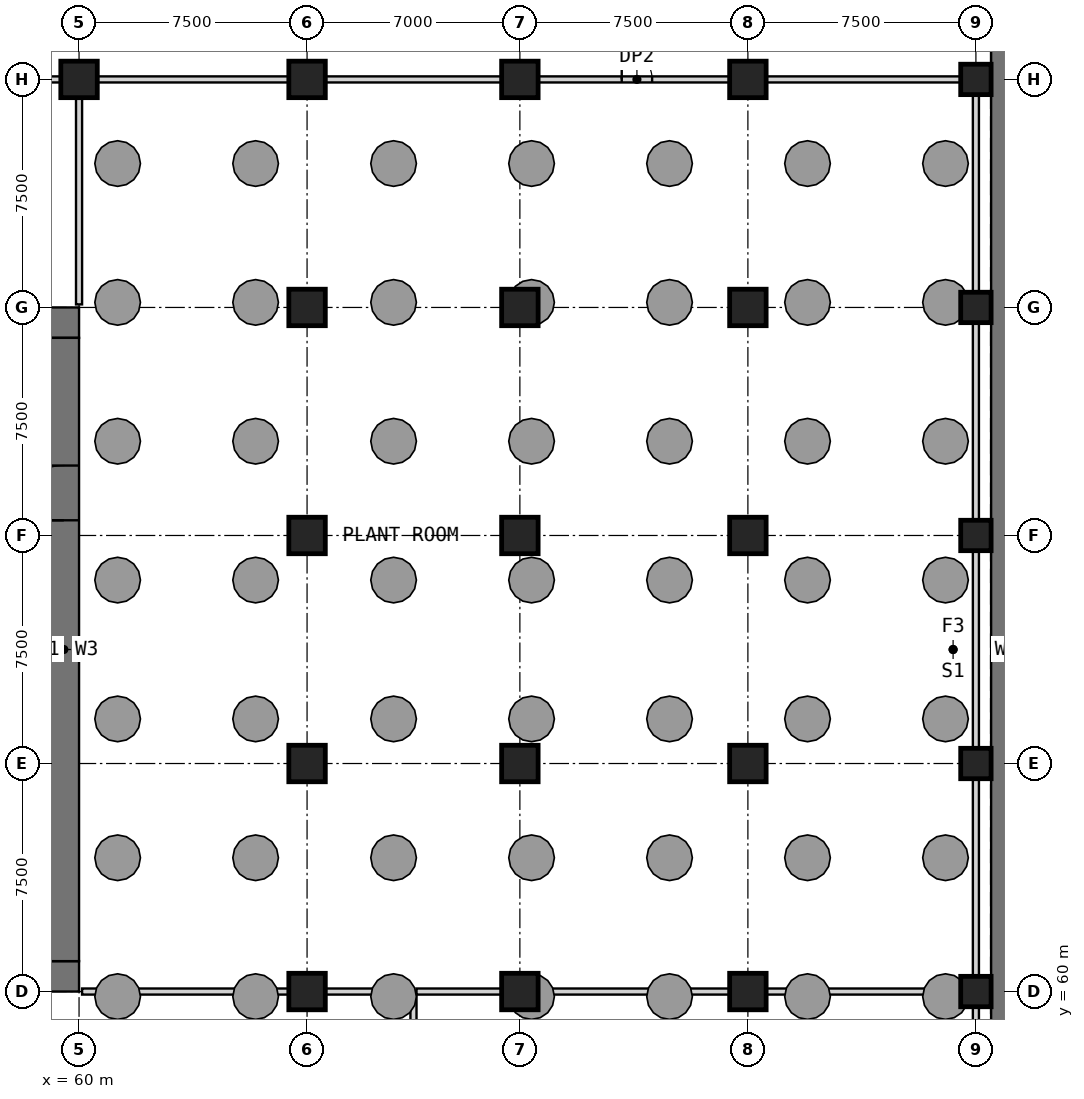
"""IFC4 building model, lengths in metres.
Left out: names, types, materials, properties, quantities, classifications, styles, units other than length and angle.
Written with IfcOpenShell. Run it as: python <this file> out.ifc"""

import sys

from ifc_helpers import new_model, si_unit, direction, frame, frame_2d, origin, origin_2d, place, context, subcontext, project, spatial, rectangle, extrude, element, fill, save


model = new_model("IFC4")
c1 = context("Model", 3, precision=1e-05, world=origin(), true_north=direction((0.0, 1.0)))
c2 = subcontext(c1, "Body", "Model", "MODEL_VIEW")
j1 = project(units=[si_unit("LENGTHUNIT", "METRE"), si_unit("PLANEANGLEUNIT", "RADIAN")], contexts=[c1])
p1 = place(None, origin())
s1 = spatial("IfcSite", under=j1, at=p1, CompositionType="ELEMENT")
p2 = place(p1, origin())
s2 = spatial("IfcBuilding", under=s1, at=p2, CompositionType="ELEMENT")
p3 = place(p2, frame((0.0, 0.0, -12.0)))
s3 = spatial("IfcBuildingStorey", under=s2, at=p3, CompositionType="ELEMENT", Elevation=-12.0)
p4 = place(p3, frame((90.5, 25.0, 0.0), z_axis=(0.0, 0.0, 1.0), x_axis=(0.0, 1.0, 0.0)))
e1 = element("IfcWall", 1, at=p4, inside=s3, PredefinedType="SHEAR", context=c2, shape_type="SweptSolid", body=[
    extrude(rectangle(XDim=92.5, YDim=1.0, at=frame_2d((46.25, 0.0))), origin(), (0.0, 0.0, 1.0), 5.4),
])
p5 = place(p4, frame((23.15, 0.0, 0.0)))
e2 = element("IfcOpeningElement", 2, at=p5, cuts=e1, PredefinedType="OPENING", context=c2, shape_type="SweptSolid", body=[
    extrude(rectangle(XDim=1.5, YDim=2.1, at=frame_2d((0.75, 1.05))), frame((0.0, 0.51, 0.0), z_axis=(0.0, -1.0, 0.0), x_axis=(1.0, 0.0, 0.0)), (0.0, 0.0, 1.0), 1.02),
])
p6 = place(p4, frame((67.75, 0.0, 0.0)))
e3 = element("IfcOpeningElement", 3, at=p6, cuts=e1, PredefinedType="OPENING", context=c2, shape_type="SweptSolid", body=[
    extrude(rectangle(XDim=1.5, YDim=2.1, at=frame_2d((0.75, 1.05))), frame((0.0, 0.51, 0.0), z_axis=(0.0, -1.0, 0.0), x_axis=(1.0, 0.0, 0.0)), (0.0, 0.0, 1.0), 1.02),
])
for number, where, z_axis, x_axis in (
    (4, (60.0, 90.0, 0.0), (0.0, 0.0, 1.0), (1.0, 0.0, 0.0)),
    (5, (67.5, 60.0, 0.0), (0.0, 0.0, 1.0), (1.0, 0.0, 0.0)),
    (6, (67.5, 67.5, 0.0), (0.0, 0.0, 1.0), (1.0, 0.0, 0.0)),
    (7, (67.5, 75.0, 0.0), (0.0, 0.0, 1.0), (1.0, 0.0, 0.0)),
    (8, (67.5, 82.5, 0.0), (0.0, 0.0, 1.0), (1.0, 0.0, 0.0)),
    (9, (67.5, 90.0, 0.0), (0.0, 0.0, 1.0), (1.0, 0.0, 0.0)),
    (10, (74.5, 60.0, 0.0), (0.0, 0.0, 1.0), (1.0, 0.0, 0.0)),
    (11, (74.5, 67.5, 0.0), (0.0, 0.0, 1.0), (1.0, 0.0, 0.0)),
    (12, (74.5, 75.0, 0.0), (0.0, 0.0, 1.0), (1.0, 0.0, 0.0)),
    (13, (74.5, 82.5, 0.0), (0.0, 0.0, 1.0), (1.0, 0.0, 0.0)),
    (14, (74.5, 90.0, 0.0), (0.0, 0.0, 1.0), (1.0, 0.0, 0.0)),
    (15, (82.0, 60.0, 0.0), (0.0, 0.0, 1.0), (1.0, 0.0, 0.0)),
    (16, (82.0, 67.5, 0.0), (0.0, 0.0, 1.0), (1.0, 0.0, 0.0)),
    (17, (82.0, 75.0, 0.0), (0.0, 0.0, 1.0), (1.0, 0.0, 0.0)),
    (18, (82.0, 82.5, 0.0), (0.0, 0.0, 1.0), (1.0, 0.0, 0.0)),
    (19, (82.0, 90.0, 0.0), (0.0, 0.0, 1.0), (1.0, 0.0, 0.0)),
):
    element("IfcColumn", number, at=place(p3, frame(where, z_axis=z_axis, x_axis=x_axis)), inside=s3, PredefinedType="COLUMN", context=c2, shape_type="SweptSolid", body=[
        extrude(rectangle(XDim=1.2, YDim=1.2, at=origin_2d()), origin(), (0.0, 0.0, 1.0), 6.0),
    ])
for number, where, z_axis, x_axis in (
    (20, (89.5, 60.0, 0.0), (0.0, 0.0, 1.0), (1.0, 0.0, 0.0)),
    (21, (89.5, 67.5, 0.0), (0.0, 0.0, 1.0), (1.0, 0.0, 0.0)),
    (22, (89.5, 75.0, 0.0), (0.0, 0.0, 1.0), (1.0, 0.0, 0.0)),
    (23, (89.5, 82.5, 0.0), (0.0, 0.0, 1.0), (1.0, 0.0, 0.0)),
    (24, (89.5, 90.0, 0.0), (0.0, 0.0, 1.0), (1.0, 0.0, 0.0)),
):
    element("IfcColumn", number, at=place(p3, frame(where, z_axis=z_axis, x_axis=x_axis)), inside=s3, PredefinedType="COLUMN", context=c2, shape_type="SweptSolid", body=[
        extrude(rectangle(XDim=1.0, YDim=1.0, at=origin_2d()), origin(), (0.0, 0.0, 1.0), 6.0),
    ])
p7 = place(p3, frame((30.0, 60.5, 0.0), z_axis=(0.0, 0.0, 1.0), x_axis=(1.0, 0.0, 0.0)))
e25 = element("IfcWall", 25, at=p7, inside=s3, PredefinedType="SHEAR", context=c2, shape_type="SweptSolid", body=[
    extrude(rectangle(XDim=30.0, YDim=1.0, at=frame_2d((15.0, 0.0))), origin(), (0.0, 0.0, 1.0), 6.0),
])
p8 = place(p7, frame((21.9, 0.0, 0.0)))
e26 = element("IfcOpeningElement", 26, at=p8, cuts=e25, PredefinedType="OPENING", context=c2, shape_type="SweptSolid", body=[
    extrude(rectangle(XDim=1.8, YDim=2.1, at=frame_2d((0.9, 1.05))), frame((0.0, 0.51, 0.0), z_axis=(0.0, -1.0, 0.0), x_axis=(1.0, 0.0, 0.0)), (0.0, 0.0, 1.0), 1.02),
])
p9 = place(p7, frame((26.5, 0.0, 0.0)))
e27 = element("IfcOpeningElement", 27, at=p9, cuts=e25, PredefinedType="OPENING", context=c2, shape_type="SweptSolid", body=[
    extrude(rectangle(XDim=1.2, YDim=2.1, at=frame_2d((0.6, 1.05))), frame((0.0, 0.51, 0.0), z_axis=(0.0, -1.0, 0.0), x_axis=(1.0, 0.0, 0.0)), (0.0, 0.0, 1.0), 1.02),
])
p10 = place(p3, frame((30.0, 82.0, 0.0), z_axis=(0.0, 0.0, 1.0), x_axis=(1.0, 0.0, 0.0)))
e28 = element("IfcWall", 28, at=p10, inside=s3, PredefinedType="SHEAR", context=c2, shape_type="SweptSolid", body=[
    extrude(rectangle(XDim=30.0, YDim=1.0, at=frame_2d((15.0, 0.0))), origin(), (0.0, 0.0, 1.0), 6.0),
])
p11 = place(p3, frame((59.5, 61.0, 0.0), z_axis=(0.0, 0.0, 1.0), x_axis=(0.0, 1.0, 0.0)))
e29 = element("IfcWall", 29, at=p11, inside=s3, PredefinedType="SHEAR", context=c2, shape_type="SweptSolid", body=[
    extrude(rectangle(XDim=20.5, YDim=1.0, at=frame_2d((10.25, 0.0))), origin(), (0.0, 0.0, 1.0), 6.0),
])
p12 = place(p11, frame((14.5, 0.0, 0.0)))
e30 = element("IfcOpeningElement", 30, at=p12, cuts=e29, PredefinedType="OPENING", context=c2, shape_type="SweptSolid", body=[
    extrude(rectangle(XDim=1.8, YDim=2.1, at=frame_2d((0.9, 1.05))), frame((0.0, 0.51, 0.0), z_axis=(0.0, -1.0, 0.0), x_axis=(1.0, 0.0, 0.0)), (0.0, 0.0, 1.0), 1.02),
])
for number, where, z_axis, x_axis in (
    (31, (53.1, 90.0, 0.0), (0.0, 0.0, 1.0), (1.0, 0.0, 0.0)),
    (32, (60.6, 90.0, 0.0), (0.0, 0.0, 1.0), (1.0, 0.0, 0.0)),
):
    element("IfcWall", number, at=place(p3, frame(where, z_axis=z_axis, x_axis=x_axis)), inside=s3, PredefinedType="PARTITIONING", context=c2, shape_type="SweptSolid", body=[
        extrude(rectangle(XDim=6.3, YDim=0.2, at=frame_2d((3.15, 0.0))), origin(), (0.0, 0.0, 1.0), 5.4),
    ])
p13 = place(p3, frame((68.1, 90.0, 0.0), z_axis=(0.0, 0.0, 1.0), x_axis=(1.0, 0.0, 0.0)))
e33 = element("IfcWall", 33, at=p13, inside=s3, PredefinedType="PARTITIONING", context=c2, shape_type="SweptSolid", body=[
    extrude(rectangle(XDim=5.8, YDim=0.2, at=frame_2d((2.9, 0.0))), origin(), (0.0, 0.0, 1.0), 5.4),
])
p14 = place(p3, frame((75.1, 90.0, 0.0), z_axis=(0.0, 0.0, 1.0), x_axis=(1.0, 0.0, 0.0)))
e34 = element("IfcWall", 34, at=p14, inside=s3, PredefinedType="PARTITIONING", context=c2, shape_type="SweptSolid", body=[
    extrude(rectangle(XDim=6.3, YDim=0.2, at=frame_2d((3.15, 0.0))), origin(), (0.0, 0.0, 1.0), 5.4),
])
p15 = place(p14, frame((2.75, 0.0, 0.0)))
e35 = element("IfcOpeningElement", 35, at=p15, cuts=e34, PredefinedType="OPENING", context=c2, shape_type="SweptSolid", body=[
    extrude(rectangle(XDim=1.0, YDim=2.1, at=frame_2d((0.5, 1.05))), frame((0.0, 0.11, 0.0), z_axis=(0.0, -1.0, 0.0), x_axis=(1.0, 0.0, 0.0)), (0.0, 0.0, 1.0), 0.22),
])
p16 = place(p3, frame((82.6, 90.0, 0.0), z_axis=(0.0, 0.0, 1.0), x_axis=(1.0, 0.0, 0.0)))
e36 = element("IfcWall", 36, at=p16, inside=s3, PredefinedType="PARTITIONING", context=c2, shape_type="SweptSolid", body=[
    extrude(rectangle(XDim=6.4, YDim=0.2, at=frame_2d((3.2, 0.0))), origin(), (0.0, 0.0, 1.0), 5.4),
])
p17 = place(p3, frame((60.1, 60.0, 0.0), z_axis=(0.0, 0.0, 1.0), x_axis=(1.0, 0.0, 0.0)))
e37 = element("IfcWall", 37, at=p17, inside=s3, PredefinedType="PARTITIONING", context=c2, shape_type="SweptSolid", body=[
    extrude(rectangle(XDim=6.8, YDim=0.2, at=frame_2d((3.4, 0.0))), origin(), (0.0, 0.0, 1.0), 5.4),
])
for number, where, z_axis, x_axis in (
    (38, (68.1, 60.0, 0.0), (0.0, 0.0, 1.0), (1.0, 0.0, 0.0)),
    (39, (71.1, 60.0, 0.0), (0.0, 0.0, 1.0), (1.0, 0.0, 0.0)),
):
    element("IfcWall", number, at=place(p3, frame(where, z_axis=z_axis, x_axis=x_axis)), inside=s3, PredefinedType="PARTITIONING", context=c2, shape_type="SweptSolid", body=[
        extrude(rectangle(XDim=2.8, YDim=0.2, at=frame_2d((1.4, 0.0))), origin(), (0.0, 0.0, 1.0), 5.4),
    ])
p18 = place(p3, frame((75.1, 60.0, 0.0), z_axis=(0.0, 0.0, 1.0), x_axis=(1.0, 0.0, 0.0)))
e40 = element("IfcWall", 40, at=p18, inside=s3, PredefinedType="PARTITIONING", context=c2, shape_type="SweptSolid", body=[
    extrude(rectangle(XDim=6.3, YDim=0.2, at=frame_2d((3.15, 0.0))), origin(), (0.0, 0.0, 1.0), 5.4),
])
p19 = place(p3, frame((82.6, 60.0, 0.0), z_axis=(0.0, 0.0, 1.0), x_axis=(1.0, 0.0, 0.0)))
e41 = element("IfcWall", 41, at=p19, inside=s3, PredefinedType="PARTITIONING", context=c2, shape_type="SweptSolid", body=[
    extrude(rectangle(XDim=6.4, YDim=0.2, at=frame_2d((3.2, 0.0))), origin(), (0.0, 0.0, 1.0), 5.4),
])
for number, where, z_axis, x_axis in (
    (42, (89.5, 53.0, 0.0), (0.0, 0.0, 1.0), (0.0, 1.0, 0.0)),
    (43, (89.5, 60.5, 0.0), (0.0, 0.0, 1.0), (0.0, 1.0, 0.0)),
    (44, (89.5, 68.0, 0.0), (0.0, 0.0, 1.0), (0.0, 1.0, 0.0)),
    (45, (89.5, 75.5, 0.0), (0.0, 0.0, 1.0), (0.0, 1.0, 0.0)),
    (46, (89.5, 83.0, 0.0), (0.0, 0.0, 1.0), (0.0, 1.0, 0.0)),
):
    element("IfcWall", number, at=place(p3, frame(where, z_axis=z_axis, x_axis=x_axis)), inside=s3, PredefinedType="PARTITIONING", context=c2, shape_type="SweptSolid", body=[
        extrude(rectangle(XDim=6.5, YDim=0.2, at=frame_2d((3.25, 0.0))), origin(), (0.0, 0.0, 1.0), 5.4),
    ])
p20 = place(p3, frame((71.0, 52.6, 0.0), z_axis=(0.0, 0.0, 1.0), x_axis=(0.0, 1.0, 0.0)))
e47 = element("IfcWall", 47, at=p20, inside=s3, PredefinedType="PARTITIONING", context=c2, shape_type="SweptSolid", body=[
    extrude(rectangle(XDim=7.3, YDim=0.2, at=frame_2d((3.65, 0.0))), origin(), (0.0, 0.0, 1.0), 5.4),
])
p21 = place(p3, frame((60.0, 82.6, 0.0), z_axis=(0.0, 0.0, 1.0), x_axis=(0.0, 1.0, 0.0)))
e48 = element("IfcWall", 48, at=p21, inside=s3, PredefinedType="PARTITIONING", context=c2, shape_type="SweptSolid", body=[
    extrude(rectangle(XDim=6.8, YDim=0.2, at=frame_2d((3.4, 0.0))), origin(), (0.0, 0.0, 1.0), 5.4),
])
p22 = place(p12, origin())
e49 = element("IfcDoor", 49, at=p22, inside=s3, OperationType="DOUBLE_DOOR_SINGLE_SWING", PredefinedType="DOOR", context=c2, shape_type="SweptSolid", body=[
    extrude(rectangle(XDim=1.8, YDim=2.1, at=frame_2d((0.9, 1.05))), frame((0.0, 0.025, 0.0), z_axis=(0.0, -1.0, 0.0), x_axis=(1.0, 0.0, 0.0)), (0.0, 0.0, 1.0), 0.05),
])
fill(e30, e49)
p23 = place(p15, origin())
e50 = element("IfcDoor", 50, at=p23, inside=s3, OperationType="SINGLE_SWING_LEFT", PredefinedType="DOOR", context=c2, shape_type="SweptSolid", body=[
    extrude(rectangle(XDim=1.0, YDim=2.1, at=frame_2d((0.5, 1.05))), frame((0.0, 0.025, 0.0), z_axis=(0.0, -1.0, 0.0), x_axis=(1.0, 0.0, 0.0)), (0.0, 0.0, 1.0), 0.05),
])
fill(e35, e50)
save(model, sys.argv[1])
